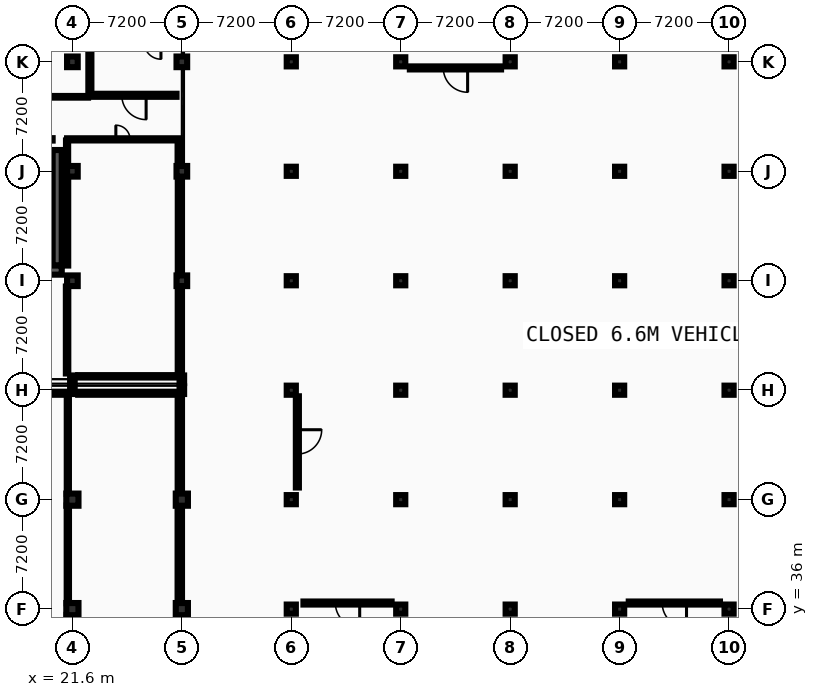
"""IFC4 building model, lengths in metres.
Left out: names, types, materials, properties, quantities, classifications, styles, units other than length and angle.
Written with IfcOpenShell. Run it as: python <this file> out.ifc"""

import sys

from ifc_helpers import new_model, si_unit, direction, frame, frame_2d, origin, origin_2d, place, context, subcontext, project, spatial, rectangle, i_section, extrude, element, fill, save


model = new_model("IFC4")
c1 = context("Model", 3, precision=1e-05, world=origin(), true_north=direction((0.0, 1.0)))
c2 = subcontext(c1, "Body", "Model", "MODEL_VIEW")
j1 = project(units=[si_unit("LENGTHUNIT", "METRE"), si_unit("PLANEANGLEUNIT", "RADIAN")], contexts=[c1])
p1 = place(None, origin())
s1 = spatial("IfcSite", under=j1, at=p1, CompositionType="ELEMENT")
p2 = place(p1, origin())
s2 = spatial("IfcBuilding", under=s1, at=p2, CompositionType="ELEMENT")
p3 = place(p2, frame((0.0, 0.0, -4.8)))
s3 = spatial("IfcBuildingStorey", under=s2, at=p3, CompositionType="ELEMENT", Elevation=-4.8)
for number, where, z_axis, x_axis in (
    (1, (21.6, 36.0, 0.0), (0.0, 0.0, 1.0), (1.0, 0.0, 0.0)),
    (2, (21.6, 43.2, 0.0), (0.0, 0.0, 1.0), (1.0, 0.0, 0.0)),
):
    element("IfcColumn", number, at=place(p3, frame(where, z_axis=z_axis, x_axis=x_axis)), inside=s3, PredefinedType="COLUMN", context=c2, shape_type="SweptSolid", body=[
        extrude(rectangle(XDim=0.8, YDim=0.8, at=origin_2d()), origin(), (0.0, 0.0, 1.0), 4.8),
    ])
for number, where, z_axis, x_axis in (
    (3, (21.6, 50.4, 0.0), (0.0, 0.0, 1.0), (1.0, 0.0, 0.0)),
    (4, (21.6, 51.12, 0.0), (0.0, 0.0, 1.0), (1.0, 0.0, 0.0)),
):
    element("IfcColumn", number, at=place(p3, frame(where, z_axis=z_axis, x_axis=x_axis)), inside=s3, PredefinedType="COLUMN", context=c2, shape_type="SweptSolid", body=[
        extrude(i_section(OverallWidth=0.3, OverallDepth=0.5, WebThickness=0.014, FlangeThickness=0.028, FilletRadius=0.027, at=origin_2d()), origin(), (0.0, 0.0, 1.0), 4.8),
    ])
for number, where, z_axis, x_axis in (
    (5, (21.6, 57.6, 0.0), (0.0, 0.0, 1.0), (1.0, 0.0, 0.0)),
    (6, (21.6, 64.8, 0.0), (0.0, 0.0, 1.0), (1.0, 0.0, 0.0)),
    (7, (21.6, 72.0, 0.0), (0.0, 0.0, 1.0), (1.0, 0.0, 0.0)),
):
    element("IfcColumn", number, at=place(p3, frame(where, z_axis=z_axis, x_axis=x_axis)), inside=s3, PredefinedType="COLUMN", context=c2, shape_type="SweptSolid", body=[
        extrude(rectangle(XDim=0.7, YDim=0.7, at=origin_2d()), origin(), (0.0, 0.0, 1.0), 4.8),
    ])
for number, where, z_axis, x_axis in (
    (8, (28.8, 36.0, 0.0), (0.0, 0.0, 1.0), (1.0, 0.0, 0.0)),
    (9, (28.8, 43.2, 0.0), (0.0, 0.0, 1.0), (1.0, 0.0, 0.0)),
):
    element("IfcColumn", number, at=place(p3, frame(where, z_axis=z_axis, x_axis=x_axis)), inside=s3, PredefinedType="COLUMN", context=c2, shape_type="SweptSolid", body=[
        extrude(rectangle(XDim=0.8, YDim=0.8, at=origin_2d()), origin(), (0.0, 0.0, 1.0), 4.8),
    ])
for number, where, z_axis, x_axis in (
    (10, (28.8, 50.4, 0.0), (0.0, 0.0, 1.0), (1.0, 0.0, 0.0)),
    (11, (28.8, 51.12, 0.0), (0.0, 0.0, 1.0), (1.0, 0.0, 0.0)),
):
    element("IfcColumn", number, at=place(p3, frame(where, z_axis=z_axis, x_axis=x_axis)), inside=s3, PredefinedType="COLUMN", context=c2, shape_type="SweptSolid", body=[
        extrude(i_section(OverallWidth=0.3, OverallDepth=0.5, WebThickness=0.014, FlangeThickness=0.028, FilletRadius=0.027, at=origin_2d()), origin(), (0.0, 0.0, 1.0), 4.8),
    ])
for number, where, z_axis, x_axis in (
    (12, (28.8, 57.6, 0.0), (0.0, 0.0, 1.0), (1.0, 0.0, 0.0)),
    (13, (28.8, 64.8, 0.0), (0.0, 0.0, 1.0), (1.0, 0.0, 0.0)),
    (14, (28.8, 72.0, 0.0), (0.0, 0.0, 1.0), (1.0, 0.0, 0.0)),
):
    element("IfcColumn", number, at=place(p3, frame(where, z_axis=z_axis, x_axis=x_axis)), inside=s3, PredefinedType="COLUMN", context=c2, shape_type="SweptSolid", body=[
        extrude(rectangle(XDim=0.7, YDim=0.7, at=origin_2d()), origin(), (0.0, 0.0, 1.0), 4.8),
    ])
for number, where, z_axis, x_axis in (
    (15, (36.0, 36.0, 0.0), (0.0, 0.0, 1.0), (1.0, 0.0, 0.0)),
    (16, (36.0, 43.2, 0.0), (0.0, 0.0, 1.0), (1.0, 0.0, 0.0)),
    (17, (36.0, 50.4, 0.0), (0.0, 0.0, 1.0), (1.0, 0.0, 0.0)),
    (18, (36.0, 57.6, 0.0), (0.0, 0.0, 1.0), (1.0, 0.0, 0.0)),
    (19, (36.0, 64.8, 0.0), (0.0, 0.0, 1.0), (1.0, 0.0, 0.0)),
    (20, (36.0, 72.0, 0.0), (0.0, 0.0, 1.0), (1.0, 0.0, 0.0)),
    (21, (43.2, 36.0, 0.0), (0.0, 0.0, 1.0), (1.0, 0.0, 0.0)),
    (22, (43.2, 43.2, 0.0), (0.0, 0.0, 1.0), (1.0, 0.0, 0.0)),
    (23, (43.2, 50.4, 0.0), (0.0, 0.0, 1.0), (1.0, 0.0, 0.0)),
    (24, (43.2, 57.6, 0.0), (0.0, 0.0, 1.0), (1.0, 0.0, 0.0)),
    (25, (43.2, 64.8, 0.0), (0.0, 0.0, 1.0), (1.0, 0.0, 0.0)),
    (26, (43.2, 72.0, 0.0), (0.0, 0.0, 1.0), (1.0, 0.0, 0.0)),
    (27, (50.4, 36.0, 0.0), (0.0, 0.0, 1.0), (1.0, 0.0, 0.0)),
    (28, (50.4, 43.2, 0.0), (0.0, 0.0, 1.0), (1.0, 0.0, 0.0)),
    (29, (50.4, 50.4, 0.0), (0.0, 0.0, 1.0), (1.0, 0.0, 0.0)),
    (30, (50.4, 57.6, 0.0), (0.0, 0.0, 1.0), (1.0, 0.0, 0.0)),
    (31, (50.4, 64.8, 0.0), (0.0, 0.0, 1.0), (1.0, 0.0, 0.0)),
    (32, (50.4, 72.0, 0.0), (0.0, 0.0, 1.0), (1.0, 0.0, 0.0)),
    (33, (57.6, 36.0, 0.0), (0.0, 0.0, 1.0), (1.0, 0.0, 0.0)),
    (34, (57.6, 43.2, 0.0), (0.0, 0.0, 1.0), (1.0, 0.0, 0.0)),
    (35, (57.6, 50.4, 0.0), (0.0, 0.0, 1.0), (1.0, 0.0, 0.0)),
    (36, (57.6, 57.6, 0.0), (0.0, 0.0, 1.0), (1.0, 0.0, 0.0)),
    (37, (57.6, 64.8, 0.0), (0.0, 0.0, 1.0), (1.0, 0.0, 0.0)),
    (38, (57.6, 72.0, 0.0), (0.0, 0.0, 1.0), (1.0, 0.0, 0.0)),
    (39, (64.8, 36.0, 0.0), (0.0, 0.0, 1.0), (1.0, 0.0, 0.0)),
    (40, (64.8, 43.2, 0.0), (0.0, 0.0, 1.0), (1.0, 0.0, 0.0)),
    (41, (64.8, 50.4, 0.0), (0.0, 0.0, 1.0), (1.0, 0.0, 0.0)),
    (42, (64.8, 57.6, 0.0), (0.0, 0.0, 1.0), (1.0, 0.0, 0.0)),
    (43, (64.8, 64.8, 0.0), (0.0, 0.0, 1.0), (1.0, 0.0, 0.0)),
    (44, (64.8, 72.0, 0.0), (0.0, 0.0, 1.0), (1.0, 0.0, 0.0)),
):
    element("IfcColumn", number, at=place(p3, frame(where, z_axis=z_axis, x_axis=x_axis)), inside=s3, PredefinedType="COLUMN", context=c2, shape_type="SweptSolid", body=[
        extrude(rectangle(XDim=0.6, YDim=0.6, at=origin_2d()), origin(), (0.0, 0.0, 1.0), 4.8),
    ])
p4 = place(p3, frame((20.6, 58.6, 0.0), z_axis=(0.0, 0.0, 1.0), x_axis=(0.0, 1.0, 0.0)))
e45 = element("IfcWall", 45, at=p4, inside=s3, PredefinedType="SHEAR", context=c2, shape_type="SweptSolid", body=[
    extrude(rectangle(XDim=7.6, YDim=0.6, at=frame_2d((3.8, 0.0))), origin(), (0.0, 0.0, 1.0), 4.5),
])
p5 = place(p3, frame((7.9, 58.3, 0.0), z_axis=(0.0, 0.0, 1.0), x_axis=(1.0, 0.0, 0.0)))
e46 = element("IfcWall", 46, at=p5, inside=s3, PredefinedType="SHEAR", context=c2, shape_type="SweptSolid", body=[
    extrude(rectangle(XDim=13.0, YDim=0.6, at=frame_2d((6.5, 0.0))), origin(), (0.0, 0.0, 1.0), 4.5),
])
p6 = place(p3, frame((22.85, 69.8, 0.0), z_axis=(0.0, 0.0, 1.0), x_axis=(1.0, 0.0, 0.0)))
e47 = element("IfcWall", 47, at=p6, inside=s3, PredefinedType="PARTITIONING", context=c2, shape_type="SweptSolid", body=[
    extrude(rectangle(XDim=5.6, YDim=0.2, at=frame_2d((2.8, 0.0))), origin(), (0.0, 0.0, 1.0), 4.545),
])
p7 = place(p6, frame((2.0, 0.0, 0.0)))
e48 = element("IfcOpeningElement", 48, at=p7, cuts=e47, PredefinedType="OPENING", context=c2, shape_type="SweptSolid", body=[
    extrude(rectangle(XDim=1.6, YDim=2.2, at=frame_2d((0.8, 1.1))), frame((0.0, 0.11, 0.0), z_axis=(0.0, -1.0, 0.0), x_axis=(1.0, 0.0, 0.0)), (0.0, 0.0, 1.0), 0.22),
])
p8 = place(p3, frame((22.75, 69.9, 0.0), z_axis=(0.0, 0.0, 1.0), x_axis=(0.0, 1.0, 0.0)))
e49 = element("IfcWall", 49, at=p8, inside=s3, PredefinedType="PARTITIONING", context=c2, shape_type="SweptSolid", body=[
    extrude(rectangle(XDim=3.2, YDim=0.2, at=frame_2d((1.6, 0.0))), origin(), (0.0, 0.0, 1.0), 4.545),
])
for number, where, z_axis, x_axis in (
    (50, (14.78, 50.2, 0.0), (0.0, 0.0, 1.0), (1.0, 0.0, 0.0)),
    (51, (21.98, 50.2, 0.0), (0.0, 0.0, 1.0), (1.0, 0.0, 0.0)),
):
    element("IfcWall", number, at=place(p3, frame(where, z_axis=z_axis, x_axis=x_axis)), inside=s3, PredefinedType="PARTITIONING", context=c2, shape_type="SweptSolid", body=[
        extrude(rectangle(XDim=6.44, YDim=0.2, at=frame_2d((3.22, 0.0))), origin(), (0.0, 0.0, 1.0), 4.095),
    ])
p9 = place(p3, frame((21.98, 51.32, 0.0), z_axis=(0.0, 0.0, 1.0), x_axis=(1.0, 0.0, 0.0)))
e52 = element("IfcWall", 52, at=p9, inside=s3, PredefinedType="PARTITIONING", context=c2, shape_type="SweptSolid", body=[
    extrude(rectangle(XDim=6.44, YDim=0.142, at=frame_2d((3.22, 0.0))), origin(), (0.0, 0.0, 1.0), 4.085),
])
p10 = place(p3, frame((8.5, 66.9, 0.0), z_axis=(0.0, 0.0, 1.0), x_axis=(1.0, 0.0, 0.0)))
e53 = element("IfcWall", 53, at=p10, inside=s3, PredefinedType="PARTITIONING", context=c2, shape_type="SweptSolid", body=[
    extrude(rectangle(XDim=11.8, YDim=0.158, at=frame_2d((5.9, 0.0))), origin(), (0.0, 0.0, 1.0), 4.545),
])
p11 = place(p10, frame((9.85, 0.0, 0.0)))
e54 = element("IfcOpeningElement", 54, at=p11, cuts=e53, PredefinedType="OPENING", context=c2, shape_type="SweptSolid", body=[
    extrude(rectangle(XDim=1.5, YDim=2.2, at=frame_2d((0.75, 1.1))), frame((0.0, 0.089, 0.0), z_axis=(0.0, -1.0, 0.0), x_axis=(1.0, 0.0, 0.0)), (0.0, 0.0, 1.0), 0.178),
])
p12 = place(p3, frame((21.25, 66.9, 0.0), z_axis=(0.0, 0.0, 1.0), x_axis=(1.0, 0.0, 0.0)))
e55 = element("IfcWall", 55, at=p12, inside=s3, PredefinedType="PARTITIONING", context=c2, shape_type="SweptSolid", body=[
    extrude(rectangle(XDim=7.35, YDim=0.142, at=frame_2d((3.675, 0.0))), origin(), (0.0, 0.0, 1.0), 4.545),
])
p13 = place(p12, frame((3.209, 0.0, 0.0)))
e56 = element("IfcOpeningElement", 56, at=p13, cuts=e55, PredefinedType="OPENING", context=c2, shape_type="SweptSolid", body=[
    extrude(rectangle(XDim=0.932, YDim=2.068, at=frame_2d((0.466, 1.034))), frame((0.0, 0.081, 0.0), z_axis=(0.0, -1.0, 0.0), x_axis=(1.0, 0.0, 0.0)), (0.0, 0.0, 1.0), 0.162),
])
p14 = place(p3, frame((6.45, 69.7, 0.0), z_axis=(0.0, 0.0, 1.0), x_axis=(1.0, 0.0, 0.0)))
e57 = element("IfcWall", 57, at=p14, inside=s3, PredefinedType="PARTITIONING", context=c2, shape_type="SweptSolid", body=[
    extrude(rectangle(XDim=16.18, YDim=0.11, at=frame_2d((8.09, 0.0))), origin(), (0.0, 0.0, 1.0), 4.545),
])
p15 = place(p14, frame((12.3, 0.0, 0.0)))
e58 = element("IfcOpeningElement", 58, at=p15, cuts=e57, PredefinedType="OPENING", context=c2, shape_type="SweptSolid", body=[
    extrude(rectangle(XDim=1.0, YDim=2.1, at=frame_2d((0.5, 1.05))), frame((0.0, 0.065, 0.0), z_axis=(0.0, -1.0, 0.0), x_axis=(1.0, 0.0, 0.0)), (0.0, 0.0, 1.0), 0.13),
])
p16 = place(p14, frame((3.42, 0.0, 0.0)))
e59 = element("IfcOpeningElement", 59, at=p16, cuts=e57, PredefinedType="OPENING", context=c2, shape_type="SweptSolid", body=[
    extrude(rectangle(XDim=0.88, YDim=2.068, at=frame_2d((0.44, 1.034))), frame((0.0, 0.065, 0.0), z_axis=(0.0, -1.0, 0.0), x_axis=(1.0, 0.0, 0.0)), (0.0, 0.0, 1.0), 0.13),
])
p17 = place(p14, frame((10.494, 0.0, 0.0)))
e60 = element("IfcOpeningElement", 60, at=p17, cuts=e57, PredefinedType="OPENING", context=c2, shape_type="SweptSolid", body=[
    extrude(rectangle(XDim=0.906, YDim=2.068, at=frame_2d((0.453, 1.034))), frame((0.0, 0.065, 0.0), z_axis=(0.0, -1.0, 0.0), x_axis=(1.0, 0.0, 0.0)), (0.0, 0.0, 1.0), 0.13),
])
p18 = place(p3, frame((21.25, 51.5, 0.0), z_axis=(0.0, 0.0, 1.0), x_axis=(0.0, 1.0, 0.0)))
e61 = element("IfcWall", 61, at=p18, inside=s3, PredefinedType="PARTITIONING", context=c2, shape_type="SweptSolid", body=[
    extrude(rectangle(XDim=5.72, YDim=0.16, at=frame_2d((2.86, 0.0))), origin(), (0.0, 0.0, 1.0), 4.545),
])
p19 = place(p3, frame((21.25, 58.6, 0.0), z_axis=(0.0, 0.0, 1.0), x_axis=(0.0, 1.0, 0.0)))
e62 = element("IfcWall", 62, at=p19, inside=s3, PredefinedType="PARTITIONING", context=c2, shape_type="SweptSolid", body=[
    extrude(rectangle(XDim=5.82, YDim=0.15, at=frame_2d((2.91, 0.0))), origin(), (0.0, 0.0, 1.0), 4.545),
])
p20 = place(p3, frame((21.25, 65.18, 0.0), z_axis=(0.0, 0.0, 1.0), x_axis=(0.0, 1.0, 0.0)))
e63 = element("IfcWall", 63, at=p20, inside=s3, PredefinedType="PARTITIONING", context=c2, shape_type="SweptSolid", body=[
    extrude(rectangle(XDim=1.649, YDim=0.142, at=frame_2d((0.825, 0.0))), origin(), (0.0, 0.0, 1.0), 4.545),
])
p21 = place(p3, frame((21.3, 29.18, 0.0), z_axis=(0.0, 0.0, 1.0), x_axis=(0.0, 1.0, 0.0)))
e64 = element("IfcWall", 64, at=p21, inside=s3, PredefinedType="PARTITIONING", context=c2, shape_type="SweptSolid", body=[
    extrude(rectangle(XDim=6.44, YDim=0.16, at=frame_2d((3.22, 0.0))), origin(), (0.0, 0.0, 1.0), 4.245),
])
p22 = place(p3, frame((21.3, 36.38, 0.0), z_axis=(0.0, 0.0, 1.0), x_axis=(0.0, 1.0, 0.0)))
e65 = element("IfcWall", 65, at=p22, inside=s3, PredefinedType="PARTITIONING", context=c2, shape_type="SweptSolid", body=[
    extrude(rectangle(XDim=6.44, YDim=0.15, at=frame_2d((3.22, 0.0))), origin(), (0.0, 0.0, 1.0), 4.245),
])
p23 = place(p3, frame((21.3, 43.58, 0.0), z_axis=(0.0, 0.0, 1.0), x_axis=(0.0, 1.0, 0.0)))
e66 = element("IfcWall", 66, at=p23, inside=s3, PredefinedType="PARTITIONING", context=c2, shape_type="SweptSolid", body=[
    extrude(rectangle(XDim=6.44, YDim=0.142, at=frame_2d((3.22, 0.0))), origin(), (0.0, 0.0, 1.0), 4.245),
])
p24 = place(p3, frame((28.6, 29.18, 0.0), z_axis=(0.0, 0.0, 1.0), x_axis=(0.0, 1.0, 0.0)))
e67 = element("IfcWall", 67, at=p24, inside=s3, PredefinedType="PARTITIONING", context=c2, shape_type="SweptSolid", body=[
    extrude(rectangle(XDim=6.44, YDim=0.135, at=frame_2d((3.22, 0.0))), origin(), (0.0, 0.0, 1.0), 4.245),
])
p25 = place(p3, frame((28.6, 36.38, 0.0), z_axis=(0.0, 0.0, 1.0), x_axis=(0.0, 1.0, 0.0)))
e68 = element("IfcWall", 68, at=p25, inside=s3, PredefinedType="PARTITIONING", context=c2, shape_type="SweptSolid", body=[
    extrude(rectangle(XDim=6.44, YDim=0.16, at=frame_2d((3.22, 0.0))), origin(), (0.0, 0.0, 1.0), 4.245),
])
p26 = place(p3, frame((28.6, 43.58, 0.0), z_axis=(0.0, 0.0, 1.0), x_axis=(0.0, 1.0, 0.0)))
e69 = element("IfcWall", 69, at=p26, inside=s3, PredefinedType="PARTITIONING", context=c2, shape_type="SweptSolid", body=[
    extrude(rectangle(XDim=6.44, YDim=0.15, at=frame_2d((3.22, 0.0))), origin(), (0.0, 0.0, 1.0), 4.245),
])
p27 = place(p3, frame((28.6, 51.5, 0.0), z_axis=(0.0, 0.0, 1.0), x_axis=(0.0, 1.0, 0.0)))
e70 = element("IfcWall", 70, at=p27, inside=s3, PredefinedType="PARTITIONING", context=c2, shape_type="SweptSolid", body=[
    extrude(rectangle(XDim=5.72, YDim=0.142, at=frame_2d((2.86, 0.0))), origin(), (0.0, 0.0, 1.0), 4.235),
])
p28 = place(p3, frame((28.6, 57.98, 0.0), z_axis=(0.0, 0.0, 1.0), x_axis=(0.0, 1.0, 0.0)))
e71 = element("IfcWall", 71, at=p28, inside=s3, PredefinedType="PARTITIONING", context=c2, shape_type="SweptSolid", body=[
    extrude(rectangle(XDim=6.44, YDim=0.135, at=frame_2d((3.22, 0.0))), origin(), (0.0, 0.0, 1.0), 4.235),
])
p29 = place(p3, frame((28.6, 65.18, 0.0), z_axis=(0.0, 0.0, 1.0), x_axis=(0.0, 1.0, 0.0)))
e72 = element("IfcWall", 72, at=p29, inside=s3, PredefinedType="PARTITIONING", context=c2, shape_type="SweptSolid", body=[
    extrude(rectangle(XDim=1.649, YDim=0.16, at=frame_2d((0.825, 0.0))), origin(), (0.0, 0.0, 1.0), 4.235),
])
p30 = place(p3, frame((36.8, 36.4, 0.0), z_axis=(0.0, 0.0, 1.0), x_axis=(1.0, 0.0, 0.0)))
e73 = element("IfcWall", 73, at=p30, inside=s3, PredefinedType="PARTITIONING", context=c2, shape_type="SweptSolid", body=[
    extrude(rectangle(XDim=5.8, YDim=0.2, at=frame_2d((2.9, 0.0))), origin(), (0.0, 0.0, 1.0), 4.45),
])
p31 = place(p30, frame((2.1, 0.0, 0.0)))
e74 = element("IfcOpeningElement", 74, at=p31, cuts=e73, PredefinedType="OPENING", context=c2, shape_type="SweptSolid", body=[
    extrude(rectangle(XDim=1.6, YDim=2.2, at=frame_2d((0.8, 1.1))), frame((0.0, 0.11, 0.0), z_axis=(0.0, -1.0, 0.0), x_axis=(1.0, 0.0, 0.0)), (0.0, 0.0, 1.0), 0.22),
])
p32 = place(p3, frame((58.2, 36.4, 0.0), z_axis=(0.0, 0.0, 1.0), x_axis=(1.0, 0.0, 0.0)))
e75 = element("IfcWall", 75, at=p32, inside=s3, PredefinedType="PARTITIONING", context=c2, shape_type="SweptSolid", body=[
    extrude(rectangle(XDim=6.0, YDim=0.2, at=frame_2d((3.0, 0.0))), origin(), (0.0, 0.0, 1.0), 4.45),
])
p33 = place(p32, frame((2.2, 0.0, 0.0)))
e76 = element("IfcOpeningElement", 76, at=p33, cuts=e75, PredefinedType="OPENING", context=c2, shape_type="SweptSolid", body=[
    extrude(rectangle(XDim=1.6, YDim=2.2, at=frame_2d((0.8, 1.1))), frame((0.0, 0.11, 0.0), z_axis=(0.0, -1.0, 0.0), x_axis=(1.0, 0.0, 0.0)), (0.0, 0.0, 1.0), 0.22),
])
p34 = place(p3, frame((36.4, 44.0, 0.0), z_axis=(0.0, 0.0, 1.0), x_axis=(0.0, 1.0, 0.0)))
e77 = element("IfcWall", 77, at=p34, inside=s3, PredefinedType="PARTITIONING", context=c2, shape_type="SweptSolid", body=[
    extrude(rectangle(XDim=6.0, YDim=0.2, at=frame_2d((3.0, 0.0))), origin(), (0.0, 0.0, 1.0), 4.45),
])
p35 = place(p34, frame((2.2, 0.0, 0.0)))
e78 = element("IfcOpeningElement", 78, at=p35, cuts=e77, PredefinedType="OPENING", context=c2, shape_type="SweptSolid", body=[
    extrude(rectangle(XDim=1.6, YDim=2.2, at=frame_2d((0.8, 1.1))), frame((0.0, 0.11, 0.0), z_axis=(0.0, -1.0, 0.0), x_axis=(1.0, 0.0, 0.0)), (0.0, 0.0, 1.0), 0.22),
])
p36 = place(p3, frame((43.8, 71.6, 0.0), z_axis=(0.0, 0.0, 1.0), x_axis=(1.0, 0.0, 0.0)))
e79 = element("IfcWall", 79, at=p36, inside=s3, PredefinedType="PARTITIONING", context=c2, shape_type="SweptSolid", body=[
    extrude(rectangle(XDim=6.0, YDim=0.2, at=frame_2d((3.0, 0.0))), origin(), (0.0, 0.0, 1.0), 4.45),
])
p37 = place(p36, frame((2.2, 0.0, 0.0)))
e80 = element("IfcOpeningElement", 80, at=p37, cuts=e79, PredefinedType="OPENING", context=c2, shape_type="SweptSolid", body=[
    extrude(rectangle(XDim=1.6, YDim=2.2, at=frame_2d((0.8, 1.1))), frame((0.0, 0.11, 0.0), z_axis=(0.0, -1.0, 0.0), x_axis=(1.0, 0.0, 0.0)), (0.0, 0.0, 1.0), 0.22),
])
p38 = place(p7, origin())
e81 = element("IfcDoor", 81, at=p38, inside=s3, OperationType="DOUBLE_DOOR_SINGLE_SWING", PredefinedType="DOOR", context=c2, shape_type="SweptSolid", body=[
    extrude(rectangle(XDim=1.6, YDim=2.2, at=frame_2d((0.8, 1.1))), frame((0.0, 0.025, 0.0), z_axis=(0.0, -1.0, 0.0), x_axis=(1.0, 0.0, 0.0)), (0.0, 0.0, 1.0), 0.05),
])
fill(e48, e81)
p39 = place(p13, origin())
e82 = element("IfcDoor", 82, at=p39, inside=s3, OperationType="SINGLE_SWING_LEFT", PredefinedType="DOOR", context=c2, shape_type="SweptSolid", body=[
    extrude(rectangle(XDim=0.932, YDim=2.068, at=frame_2d((0.466, 1.034))), frame((0.0, 0.025, 0.0), z_axis=(0.0, -1.0, 0.0), x_axis=(1.0, 0.0, 0.0)), (0.0, 0.0, 1.0), 0.05),
])
fill(e56, e82)
p40 = place(p31, origin())
e83 = element("IfcDoor", 83, at=p40, inside=s3, OperationType="DOUBLE_DOOR_SINGLE_SWING", PredefinedType="DOOR", context=c2, shape_type="SweptSolid", body=[
    extrude(rectangle(XDim=1.6, YDim=2.2, at=frame_2d((0.8, 1.1))), frame((0.0, 0.025, 0.0), z_axis=(0.0, -1.0, 0.0), x_axis=(1.0, 0.0, 0.0)), (0.0, 0.0, 1.0), 0.05),
])
fill(e74, e83)
p41 = place(p33, origin())
e84 = element("IfcDoor", 84, at=p41, inside=s3, OperationType="DOUBLE_DOOR_SINGLE_SWING", PredefinedType="DOOR", context=c2, shape_type="SweptSolid", body=[
    extrude(rectangle(XDim=1.6, YDim=2.2, at=frame_2d((0.8, 1.1))), frame((0.0, 0.025, 0.0), z_axis=(0.0, -1.0, 0.0), x_axis=(1.0, 0.0, 0.0)), (0.0, 0.0, 1.0), 0.05),
])
fill(e76, e84)
p42 = place(p35, origin())
e85 = element("IfcDoor", 85, at=p42, inside=s3, OperationType="DOUBLE_DOOR_SINGLE_SWING", PredefinedType="DOOR", context=c2, shape_type="SweptSolid", body=[
    extrude(rectangle(XDim=1.6, YDim=2.2, at=frame_2d((0.8, 1.1))), frame((0.0, 0.025, 0.0), z_axis=(0.0, -1.0, 0.0), x_axis=(1.0, 0.0, 0.0)), (0.0, 0.0, 1.0), 0.05),
])
fill(e78, e85)
p43 = place(p37, origin())
e86 = element("IfcDoor", 86, at=p43, inside=s3, OperationType="DOUBLE_DOOR_SINGLE_SWING", PredefinedType="DOOR", context=c2, shape_type="SweptSolid", body=[
    extrude(rectangle(XDim=1.6, YDim=2.2, at=frame_2d((0.8, 1.1))), frame((0.0, 0.025, 0.0), z_axis=(0.0, -1.0, 0.0), x_axis=(1.0, 0.0, 0.0)), (0.0, 0.0, 1.0), 0.05),
])
fill(e80, e86)
save(model, sys.argv[1])
